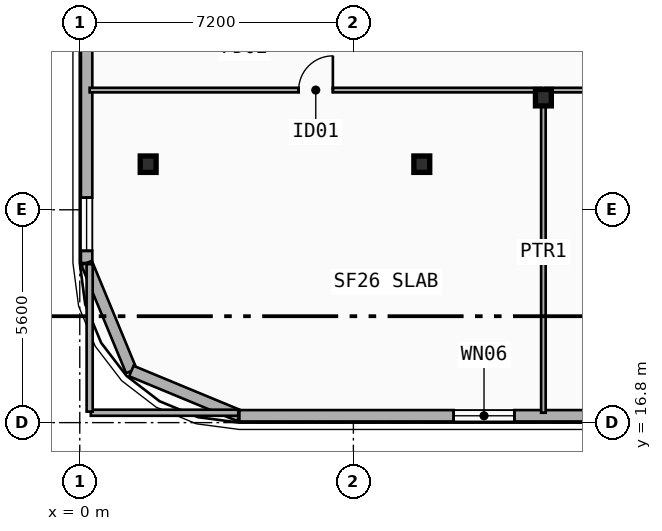
"""IFC4 building model, lengths in metres.
Left out: names, types, materials, properties, quantities, classifications, styles, units other than length and angle.
Written with IfcOpenShell. Run it as: python <this file> out.ifc"""

import sys

from ifc_helpers import new_model, si_unit, direction, frame, frame_2d, origin, origin_2d, place, context, subcontext, project, spatial, rectangle, i_section, extrude, element, fill, save


model = new_model("IFC4")
c1 = context("Model", 3, precision=1e-05, world=origin(), true_north=direction((0.0, 1.0)))
c2 = subcontext(c1, "Body", "Model", "MODEL_VIEW")
j1 = project(units=[si_unit("LENGTHUNIT", "METRE"), si_unit("PLANEANGLEUNIT", "RADIAN")], contexts=[c1])
p1 = place(None, origin())
s1 = spatial("IfcSite", under=j1, at=p1, CompositionType="ELEMENT")
p2 = place(p1, origin())
s2 = spatial("IfcBuilding", under=s1, at=p2, CompositionType="ELEMENT")
p3 = place(p2, frame((0.0, 0.0, 125.8)))
s3 = spatial("IfcBuildingStorey", under=s2, at=p3, CompositionType="ELEMENT", Elevation=125.8)
for number, where, z_axis, x_axis in (
    (1, (12.2, 25.35, 0.0), (0.0, 0.0, 1.0), (1.0, 0.0, 0.0)),
    (2, (9.0, 23.6, 0.0), (0.0, 0.0, 1.0), (1.0, 0.0, 0.0)),
    (3, (1.8, 23.6, 0.0), (0.0, 0.0, 1.0), (1.0, 0.0, 0.0)),
):
    element("IfcColumn", number, at=place(p3, frame(where, z_axis=z_axis, x_axis=x_axis)), inside=s3, PredefinedType="COLUMN", context=c2, shape_type="SweptSolid", body=[
        extrude(i_section(OverallWidth=0.418, OverallDepth=0.432, WebThickness=0.035, FlangeThickness=0.056, FilletRadius=0.015, at=origin_2d()), origin(), (0.0, 0.0, 1.0), 3.5),
    ])
p4 = place(p3, frame((0.18, 21.0, 0.0), z_axis=(0.0, 0.0, 1.0), x_axis=(0.0, 1.0, 0.0)))
e4 = element("IfcWall", 4, at=p4, inside=s3, PredefinedType="SOLIDWALL", context=c2, shape_type="SweptSolid", body=[
    extrude(rectangle(XDim=18.0, YDim=0.3, at=frame_2d((9.0, 0.0))), origin(), (0.0, 0.0, 1.0), 3.24),
])
p5 = place(p4, frame((7.47, 0.0, 0.48)))
e5 = element("IfcOpeningElement", 5, at=p5, cuts=e4, PredefinedType="OPENING", context=c2, shape_type="SweptSolid", body=[
    extrude(rectangle(XDim=1.4, YDim=1.8, at=frame_2d((0.7, 0.9))), frame((0.0, 0.16, 0.0), z_axis=(0.0, -1.0, 0.0), x_axis=(1.0, 0.0, 0.0)), (0.0, 0.0, 1.0), 0.32),
])
p6 = place(p4, frame((12.509, 0.0, 0.48)))
e6 = element("IfcOpeningElement", 6, at=p6, cuts=e4, PredefinedType="OPENING", context=c2, shape_type="SweptSolid", body=[
    extrude(rectangle(XDim=1.4, YDim=1.8, at=frame_2d((0.7, 0.9))), frame((0.0, 0.16, 0.0), z_axis=(0.0, -1.0, 0.0), x_axis=(1.0, 0.0, 0.0)), (0.0, 0.0, 1.0), 0.32),
])
p7 = place(p4, frame((0.32, 0.0, 0.65)))
e7 = element("IfcOpeningElement", 7, at=p7, cuts=e4, PredefinedType="OPENING", context=c2, shape_type="SweptSolid", body=[
    extrude(rectangle(XDim=1.4, YDim=1.8, at=frame_2d((0.7, 0.9))), frame((0.0, 0.16, 0.0), z_axis=(0.0, -1.0, 0.0), x_axis=(1.0, 0.0, 0.0)), (0.0, 0.0, 1.0), 0.32),
])
for number, where, z_axis, x_axis in (
    (8, (1.357, 18.157, 0.0), (0.0, 0.0, 1.0), (-0.383, 0.924, 0.0)),
    (9, (4.2, 16.98, 0.0), (0.0, 0.0, 1.0), (-0.924, 0.383, 0.0)),
):
    element("IfcWall", number, at=place(p3, frame(where, z_axis=z_axis, x_axis=x_axis)), inside=s3, PredefinedType="SOLIDWALL", context=c2, shape_type="SweptSolid", body=[
        extrude(rectangle(XDim=3.077, YDim=0.3, at=frame_2d((1.538, 0.0))), origin(), (0.0, 0.0, 1.0), 3.24),
    ])
p8 = place(p3, frame((53.4, 16.98, 0.0), z_axis=(0.0, 0.0, 1.0), x_axis=(-1.0, 0.0, 0.0)))
e10 = element("IfcWall", 10, at=p8, inside=s3, PredefinedType="SOLIDWALL", context=c2, shape_type="SweptSolid", body=[
    extrude(rectangle(XDim=49.2, YDim=0.3, at=frame_2d((24.6, 0.0))), origin(), (0.0, 0.0, 1.0), 3.24),
])
p9 = place(p8, frame((41.962, 0.0, 0.65)))
e11 = element("IfcOpeningElement", 11, at=p9, cuts=e10, PredefinedType="OPENING", context=c2, shape_type="SweptSolid", body=[
    extrude(rectangle(XDim=1.6, YDim=1.95, at=frame_2d((0.8, 0.975))), frame((0.0, 0.16, 0.0), z_axis=(0.0, -1.0, 0.0), x_axis=(1.0, 0.0, 0.0)), (0.0, 0.0, 1.0), 0.32),
])
p10 = place(p8, frame((30.9, 0.0, 0.48)))
e12 = element("IfcOpeningElement", 12, at=p10, cuts=e10, PredefinedType="OPENING", context=c2, shape_type="SweptSolid", body=[
    extrude(rectangle(XDim=1.8, YDim=1.8, at=frame_2d((0.9, 0.9))), frame((0.0, 0.16, 0.0), z_axis=(0.0, -1.0, 0.0), x_axis=(1.0, 0.0, 0.0)), (0.0, 0.0, 1.0), 0.32),
])
p11 = place(p8, frame((28.7, 0.0, 0.65)))
e13 = element("IfcOpeningElement", 13, at=p11, cuts=e10, PredefinedType="OPENING", context=c2, shape_type="SweptSolid", body=[
    extrude(rectangle(XDim=1.6, YDim=1.95, at=frame_2d((0.8, 0.975))), frame((0.0, 0.16, 0.0), z_axis=(0.0, -1.0, 0.0), x_axis=(1.0, 0.0, 0.0)), (0.0, 0.0, 1.0), 0.32),
])
p12 = place(p8, frame((5.1, 0.0, 0.65)))
e14 = element("IfcOpeningElement", 14, at=p12, cuts=e10, PredefinedType="OPENING", context=c2, shape_type="SweptSolid", body=[
    extrude(rectangle(XDim=1.6, YDim=1.95, at=frame_2d((0.8, 0.975))), frame((0.0, 0.16, 0.0), z_axis=(0.0, -1.0, 0.0), x_axis=(1.0, 0.0, 0.0)), (0.0, 0.0, 1.0), 0.32),
])
p13 = place(p3, frame((0.26, 25.55, 0.0), z_axis=(0.0, 0.0, 1.0), x_axis=(1.0, 0.0, 0.0)))
e15 = element("IfcWall", 15, at=p13, inside=s3, PredefinedType="PARTITIONING", context=c2, shape_type="SweptSolid", body=[
    extrude(rectangle(XDim=11.9, YDim=0.12, at=frame_2d((5.95, 0.0))), origin(), (0.0, 0.0, 1.0), 2.406),
])
p14 = place(p13, frame((5.5, 0.0, 0.0)))
e16 = element("IfcOpeningElement", 16, at=p14, cuts=e15, PredefinedType="OPENING", context=c2, shape_type="SweptSolid", body=[
    extrude(rectangle(XDim=0.9, YDim=2.1, at=frame_2d((0.45, 1.05))), frame((0.0, 0.07, 0.0), z_axis=(0.0, -1.0, 0.0), x_axis=(1.0, 0.0, 0.0)), (0.0, 0.0, 1.0), 0.14),
])
p15 = place(p3, frame((12.24, 25.55, 0.0), z_axis=(0.0, 0.0, 1.0), x_axis=(1.0, 0.0, 0.0)))
e17 = element("IfcWall", 17, at=p15, inside=s3, PredefinedType="PARTITIONING", context=c2, shape_type="SweptSolid", body=[
    extrude(rectangle(XDim=10.52, YDim=0.12, at=frame_2d((5.26, 0.0))), origin(), (0.0, 0.0, 1.0), 2.406),
])
p16 = place(p15, frame((4.81, 0.0, 0.0)))
e18 = element("IfcOpeningElement", 18, at=p16, cuts=e17, PredefinedType="OPENING", context=c2, shape_type="SweptSolid", body=[
    extrude(rectangle(XDim=0.9, YDim=2.1, at=frame_2d((0.45, 1.05))), frame((0.0, 0.07, 0.0), z_axis=(0.0, -1.0, 0.0), x_axis=(1.0, 0.0, 0.0)), (0.0, 0.0, 1.0), 0.14),
])
p17 = place(p3, frame((12.2, 17.06, 0.0), z_axis=(0.0, 0.0, 1.0), x_axis=(0.0, 1.0, 0.0)))
e19 = element("IfcWall", 19, at=p17, inside=s3, PredefinedType="PARTITIONING", context=c2, shape_type="SweptSolid", body=[
    extrude(rectangle(XDim=8.45, YDim=0.12, at=frame_2d((4.225, 0.0))), origin(), (0.0, 0.0, 1.0), 2.406),
])
p18 = place(p3, frame((0.29, 17.06, 0.0), z_axis=(0.0, 0.0, 1.0), x_axis=(1.0, 0.0, 0.0)))
e20 = element("IfcWall", 20, at=p18, inside=s3, PredefinedType="PARTITIONING", context=c2, shape_type="SweptSolid", body=[
    extrude(rectangle(XDim=3.88, YDim=0.16, at=frame_2d((1.94, 0.0))), origin(), (0.0, 0.0, 1.0), 2.72),
])
p19 = place(p3, frame((0.26, 17.09, 0.0), z_axis=(0.0, 0.0, 1.0), x_axis=(0.0, 1.0, 0.0)))
e21 = element("IfcWall", 21, at=p19, inside=s3, PredefinedType="PARTITIONING", context=c2, shape_type="SweptSolid", body=[
    extrude(rectangle(XDim=3.88, YDim=0.16, at=frame_2d((1.94, 0.0))), origin(), (0.0, 0.0, 1.0), 3.24),
])
p20 = place(p7, origin())
e22 = element("IfcWindow", 22, at=p20, inside=s3, PartitioningType="SINGLE_PANEL", PredefinedType="WINDOW", context=c2, shape_type="SweptSolid", body=[
    extrude(rectangle(XDim=1.4, YDim=1.8, at=frame_2d((0.7, 0.9))), frame((0.0, 0.03, 0.0), z_axis=(0.0, -1.0, 0.0), x_axis=(1.0, 0.0, 0.0)), (0.0, 0.0, 1.0), 0.06),
])
fill(e7, e22)
p21 = place(p9, origin())
e23 = element("IfcWindow", 23, at=p21, inside=s3, PartitioningType="SINGLE_PANEL", PredefinedType="WINDOW", context=c2, shape_type="SweptSolid", body=[
    extrude(rectangle(XDim=1.6, YDim=1.95, at=frame_2d((0.8, 0.975))), frame((0.0, 0.03, 0.0), z_axis=(0.0, -1.0, 0.0), x_axis=(1.0, 0.0, 0.0)), (0.0, 0.0, 1.0), 0.06),
])
fill(e11, e23)
p22 = place(p14, origin())
e24 = element("IfcDoor", 24, at=p22, inside=s3, OperationType="SINGLE_SWING_RIGHT", PredefinedType="DOOR", context=c2, shape_type="SweptSolid", body=[
    extrude(rectangle(XDim=0.9, YDim=2.1, at=frame_2d((0.45, 1.05))), frame((0.0, 0.025, 0.0), z_axis=(0.0, -1.0, 0.0), x_axis=(1.0, 0.0, 0.0)), (0.0, 0.0, 1.0), 0.05),
])
fill(e16, e24)
save(model, sys.argv[1])
